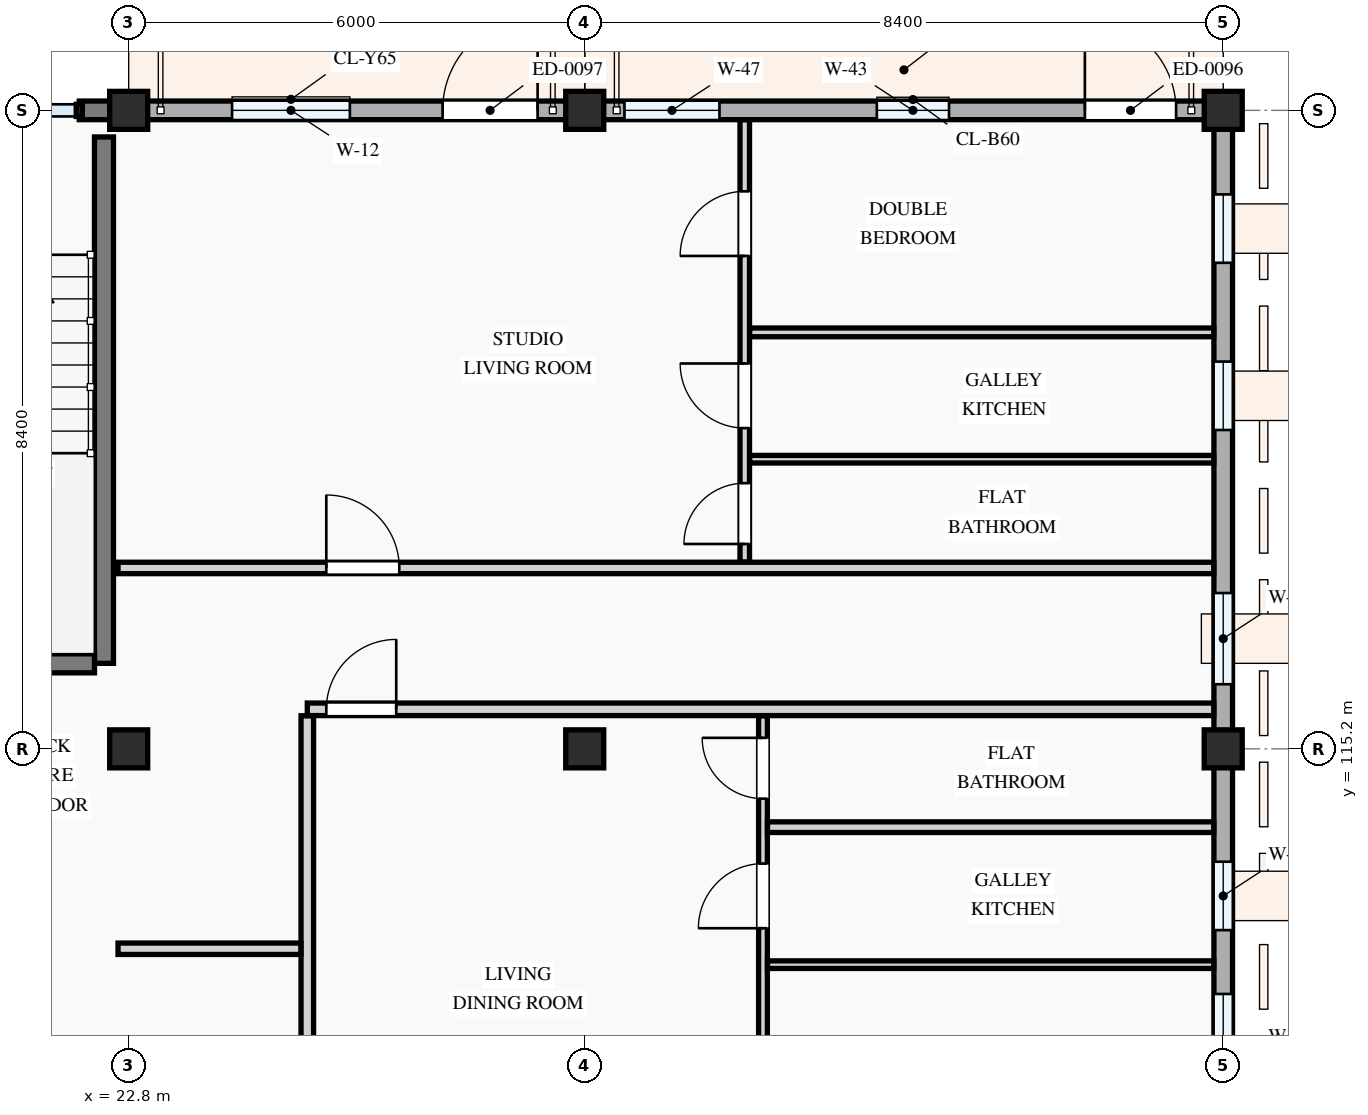
"""IFC4 building model, lengths in metres.
Left out: names, types, materials, properties, quantities, classifications, styles, units other than length and angle.
Written with IfcOpenShell. Run it as: python <this file> out.ifc"""

import sys

from ifc_helpers import new_model, si_unit, direction, frame, frame_2d, origin, origin_2d, place, context, subcontext, project, spatial, rectangle, extrude, element, fill, save


model = new_model("IFC4")
c1 = context("Model", 3, precision=1e-05, world=origin(), true_north=direction((0.0, 1.0)))
c2 = subcontext(c1, "Body", "Model", "MODEL_VIEW")
j1 = project(units=[si_unit("LENGTHUNIT", "METRE"), si_unit("PLANEANGLEUNIT", "RADIAN")], contexts=[c1])
p1 = place(None, origin())
s1 = spatial("IfcSite", under=j1, at=p1, CompositionType="ELEMENT")
p2 = place(p1, origin())
s2 = spatial("IfcBuilding", under=s1, at=p2, CompositionType="ELEMENT")
p3 = place(p2, frame((0.0, 0.0, 41.1)))
s3 = spatial("IfcBuildingStorey", under=s2, at=p3, CompositionType="ELEMENT", Elevation=41.1)
for number, where, z_axis, x_axis in (
    (1, (22.8, 115.2, 0.0), (0.0, 0.0, 1.0), (1.0, 0.0, 0.0)),
    (2, (22.8, 123.6, 0.0), (0.0, 0.0, 1.0), (1.0, 0.0, 0.0)),
    (3, (28.8, 115.2, 0.0), (0.0, 0.0, 1.0), (1.0, 0.0, 0.0)),
    (4, (28.8, 123.6, 0.0), (0.0, 0.0, 1.0), (1.0, 0.0, 0.0)),
    (5, (37.2, 115.2, 0.0), (0.0, 0.0, 1.0), (1.0, 0.0, 0.0)),
    (6, (37.2, 123.6, 0.0), (0.0, 0.0, 1.0), (1.0, 0.0, 0.0)),
):
    element("IfcColumn", number, at=place(p3, frame(where, z_axis=z_axis, x_axis=x_axis)), inside=s3, PredefinedType="COLUMN", context=c2, shape_type="SweptSolid", body=[
        extrude(rectangle(XDim=0.5, YDim=0.5, at=origin_2d()), origin(), (0.0, 0.0, 1.0), 3.3),
    ])
p4 = place(p3, frame((37.2, 109.2, 0.0), z_axis=(0.0, 0.0, 1.0), x_axis=(0.0, 1.0, 0.0)))
e7 = element("IfcWall", 7, at=p4, inside=s3, PredefinedType="STANDARD", context=c2, shape_type="SweptSolid", body=[
    extrude(rectangle(XDim=6.0, YDim=0.245, at=frame_2d((3.0, 0.0))), origin(), (0.0, 0.0, 1.0), 2.575),
])
p5 = place(p4, frame((0.575, 0.0, 0.78)))
e8 = element("IfcOpeningElement", 8, at=p5, cuts=e7, PredefinedType="OPENING", context=c2, shape_type="SweptSolid", body=[
    extrude(rectangle(XDim=2.2, YDim=1.5, at=frame_2d((1.1, 0.75))), frame((0.0, 0.133, 0.0), z_axis=(0.0, -1.0, 0.0), x_axis=(1.0, 0.0, 0.0)), (0.0, 0.0, 1.0), 0.265),
])
p6 = place(p4, frame((3.615, 0.0, 0.78)))
e9 = element("IfcOpeningElement", 9, at=p6, cuts=e7, PredefinedType="OPENING", context=c2, shape_type="SweptSolid", body=[
    extrude(rectangle(XDim=0.9, YDim=1.2, at=frame_2d((0.45, 0.6))), frame((0.0, 0.133, 0.0), z_axis=(0.0, -1.0, 0.0), x_axis=(1.0, 0.0, 0.0)), (0.0, 0.0, 1.0), 0.265),
])
p7 = place(p3, frame((37.2, 115.2, 0.0), z_axis=(0.0, 0.0, 1.0), x_axis=(0.0, 1.0, 0.0)))
e10 = element("IfcWall", 10, at=p7, inside=s3, PredefinedType="STANDARD", context=c2, shape_type="SweptSolid", body=[
    extrude(rectangle(XDim=8.4, YDim=0.245, at=frame_2d((4.2, 0.0))), origin(), (0.0, 0.0, 1.0), 2.425),
])
p8 = place(p7, frame((0.85, 0.0, 0.78)))
e11 = element("IfcOpeningElement", 11, at=p8, cuts=e10, PredefinedType="OPENING", context=c2, shape_type="SweptSolid", body=[
    extrude(rectangle(XDim=1.2, YDim=1.35, at=frame_2d((0.6, 0.675))), frame((0.0, 0.133, 0.0), z_axis=(0.0, -1.0, 0.0), x_axis=(1.0, 0.0, 0.0)), (0.0, 0.0, 1.0), 0.265),
])
p9 = place(p7, frame((4.195, 0.0, 0.78)))
e12 = element("IfcOpeningElement", 12, at=p9, cuts=e10, PredefinedType="OPENING", context=c2, shape_type="SweptSolid", body=[
    extrude(rectangle(XDim=0.9, YDim=1.2, at=frame_2d((0.45, 0.6))), frame((0.0, 0.133, 0.0), z_axis=(0.0, -1.0, 0.0), x_axis=(1.0, 0.0, 0.0)), (0.0, 0.0, 1.0), 0.265),
])
p10 = place(p7, frame((6.395, 0.0, 0.78)))
e13 = element("IfcOpeningElement", 13, at=p10, cuts=e10, PredefinedType="OPENING", context=c2, shape_type="SweptSolid", body=[
    extrude(rectangle(XDim=0.9, YDim=1.2, at=frame_2d((0.45, 0.6))), frame((0.0, 0.133, 0.0), z_axis=(0.0, -1.0, 0.0), x_axis=(1.0, 0.0, 0.0)), (0.0, 0.0, 1.0), 0.265),
])
p11 = place(p3, frame((37.2, 123.6, 0.0), z_axis=(0.0, 0.0, 1.0), x_axis=(-1.0, 0.0, 0.0)))
e14 = element("IfcWall", 14, at=p11, inside=s3, PredefinedType="STANDARD", context=c2, shape_type="SweptSolid", body=[
    extrude(rectangle(XDim=8.4, YDim=0.245, at=frame_2d((4.2, 0.0))), origin(), (0.0, 0.0, 1.0), 2.345),
])
p12 = place(p11, frame((0.62, 0.0, 0.0)))
e15 = element("IfcOpeningElement", 15, at=p12, cuts=e14, PredefinedType="OPENING", context=c2, shape_type="SweptSolid", body=[
    extrude(rectangle(XDim=1.2, YDim=2.15, at=frame_2d((0.6, 1.075))), frame((0.0, 0.133, 0.0), z_axis=(0.0, -1.0, 0.0), x_axis=(1.0, 0.0, 0.0)), (0.0, 0.0, 1.0), 0.265),
])
p13 = place(p11, frame((3.607, 0.0, 0.78)))
e16 = element("IfcOpeningElement", 16, at=p13, cuts=e14, PredefinedType="OPENING", context=c2, shape_type="SweptSolid", body=[
    extrude(rectangle(XDim=0.95, YDim=1.15, at=frame_2d((0.475, 0.575))), frame((0.0, 0.133, 0.0), z_axis=(0.0, -1.0, 0.0), x_axis=(1.0, 0.0, 0.0)), (0.0, 0.0, 1.0), 0.265),
])
p14 = place(p11, frame((6.627, 0.0, 0.78)))
e17 = element("IfcOpeningElement", 17, at=p14, cuts=e14, PredefinedType="OPENING", context=c2, shape_type="SweptSolid", body=[
    extrude(rectangle(XDim=1.25, YDim=1.45, at=frame_2d((0.625, 0.725))), frame((0.0, 0.133, 0.0), z_axis=(0.0, -1.0, 0.0), x_axis=(1.0, 0.0, 0.0)), (0.0, 0.0, 1.0), 0.265),
])
p15 = place(p3, frame((28.8, 123.6, 0.0), z_axis=(0.0, 0.0, 1.0), x_axis=(-1.0, 0.0, 0.0)))
e18 = element("IfcWall", 18, at=p15, inside=s3, PredefinedType="STANDARD", context=c2, shape_type="SweptSolid", body=[
    extrude(rectangle(XDim=6.0, YDim=0.245, at=frame_2d((3.0, 0.0))), origin(), (0.0, 0.0, 1.0), 2.445),
])
p16 = place(p15, frame((0.62, 0.0, 0.0)))
e19 = element("IfcOpeningElement", 19, at=p16, cuts=e18, PredefinedType="OPENING", context=c2, shape_type="SweptSolid", body=[
    extrude(rectangle(XDim=1.25, YDim=2.2, at=frame_2d((0.625, 1.1))), frame((0.0, 0.133, 0.0), z_axis=(0.0, -1.0, 0.0), x_axis=(1.0, 0.0, 0.0)), (0.0, 0.0, 1.0), 0.265),
])
p17 = place(p15, frame((3.09, 0.0, 0.78)))
e20 = element("IfcOpeningElement", 20, at=p17, cuts=e18, PredefinedType="OPENING", context=c2, shape_type="SweptSolid", body=[
    extrude(rectangle(XDim=1.55, YDim=1.4, at=frame_2d((0.775, 0.7))), frame((0.0, 0.133, 0.0), z_axis=(0.0, -1.0, 0.0), x_axis=(1.0, 0.0, 0.0)), (0.0, 0.0, 1.0), 0.265),
])
p18 = place(p3, frame((22.8, 123.6, 0.0), z_axis=(0.0, 0.0, 1.0), x_axis=(-1.0, 0.0, 0.0)))
e21 = element("IfcWall", 21, at=p18, inside=s3, PredefinedType="STANDARD", context=c2, shape_type="SweptSolid", body=[
    extrude(rectangle(XDim=0.65, YDim=0.245, at=frame_2d((0.325, 0.0))), origin(), (0.0, 0.0, 1.0), 3.04),
])
p19 = place(p3, frame((22.475, 123.25, 0.0), z_axis=(0.0, 0.0, 1.0), x_axis=(0.0, -1.0, 0.0)))
e22 = element("IfcWall", 22, at=p19, inside=s3, PredefinedType="SHEAR", context=c2, shape_type="SweptSolid", body=[
    extrude(rectangle(XDim=6.925, YDim=0.25, at=frame_2d((3.462, 0.0))), origin(), (0.0, 0.0, 1.0), 3.0),
])
p20 = place(p3, frame((8.85, 116.325, 0.0), z_axis=(0.0, 0.0, 1.0), x_axis=(1.0, 0.0, 0.0)))
e23 = element("IfcWall", 23, at=p20, inside=s3, PredefinedType="SHEAR", context=c2, shape_type="SweptSolid", body=[
    extrude(rectangle(XDim=13.5, YDim=0.25, at=frame_2d((6.75, 0.0))), origin(), (0.0, 0.0, 1.0), 3.0),
])
p21 = place(p20, frame((6.2, 0.0, 0.0)))
e24 = element("IfcOpeningElement", 24, at=p21, cuts=e23, PredefinedType="OPENING", context=c2, shape_type="SweptSolid", body=[
    extrude(rectangle(XDim=1.1, YDim=2.15, at=frame_2d((0.55, 1.075))), frame((0.0, 0.135, 0.0), z_axis=(0.0, -1.0, 0.0), x_axis=(1.0, 0.0, 0.0)), (0.0, 0.0, 1.0), 0.27),
])
p22 = place(p3, frame((25.15, 109.324, 0.0), z_axis=(0.0, 0.0, 1.0), x_axis=(0.0, 1.0, 0.0)))
e25 = element("IfcWall", 25, at=p22, inside=s3, PredefinedType="PARTITIONING", context=c2, shape_type="SweptSolid", body=[
    extrude(rectangle(XDim=6.311, YDim=0.165, at=frame_2d((3.156, 0.0))), origin(), (0.0, 0.0, 1.0), 3.0),
])
p23 = place(p3, frame((22.66, 112.57, 0.0), z_axis=(0.0, 0.0, 1.0), x_axis=(1.0, 0.0, 0.0)))
e26 = element("IfcWall", 26, at=p23, inside=s3, PredefinedType="PARTITIONING", context=c2, shape_type="SweptSolid", body=[
    extrude(rectangle(XDim=2.406, YDim=0.15, at=frame_2d((1.203, 0.0))), origin(), (0.0, 0.0, 1.0), 3.0),
])
p24 = place(p3, frame((31.145, 109.324, 0.0), z_axis=(0.0, 0.0, 1.0), x_axis=(0.0, 1.0, 0.0)))
e27 = element("IfcWall", 27, at=p24, inside=s3, PredefinedType="PARTITIONING", context=c2, shape_type="SweptSolid", body=[
    extrude(rectangle(XDim=6.311, YDim=0.115, at=frame_2d((3.156, 0.0))), origin(), (0.0, 0.0, 1.0), 3.0),
])
p25 = place(p24, frame((1.061, 0.0, 0.0)))
e28 = element("IfcOpeningElement", 28, at=p25, cuts=e27, PredefinedType="OPENING", context=c2, shape_type="SweptSolid", body=[
    extrude(rectangle(XDim=0.85, YDim=2.1, at=frame_2d((0.425, 1.05))), frame((0.0, 0.067, 0.0), z_axis=(0.0, -1.0, 0.0), x_axis=(1.0, 0.0, 0.0)), (0.0, 0.0, 1.0), 0.135),
])
p26 = place(p24, frame((3.516, 0.0, 0.0)))
e29 = element("IfcOpeningElement", 29, at=p26, cuts=e27, PredefinedType="OPENING", context=c2, shape_type="SweptSolid", body=[
    extrude(rectangle(XDim=0.85, YDim=2.1, at=frame_2d((0.425, 1.05))), frame((0.0, 0.067, 0.0), z_axis=(0.0, -1.0, 0.0), x_axis=(1.0, 0.0, 0.0)), (0.0, 0.0, 1.0), 0.135),
])
p27 = place(p24, frame((5.22, 0.0, 0.0)))
e30 = element("IfcOpeningElement", 30, at=p27, cuts=e27, PredefinedType="OPENING", context=c2, shape_type="SweptSolid", body=[
    extrude(rectangle(XDim=0.8, YDim=2.1, at=frame_2d((0.4, 1.05))), frame((0.0, 0.067, 0.0), z_axis=(0.0, -1.0, 0.0), x_axis=(1.0, 0.0, 0.0)), (0.0, 0.0, 1.0), 0.135),
])
p28 = place(p3, frame((31.205, 112.361, 0.0), z_axis=(0.0, 0.0, 1.0), x_axis=(1.0, 0.0, 0.0)))
e31 = element("IfcWall", 31, at=p28, inside=s3, PredefinedType="PARTITIONING", context=c2, shape_type="SweptSolid", body=[
    extrude(rectangle(XDim=5.871, YDim=0.1, at=frame_2d((2.936, 0.0))), origin(), (0.0, 0.0, 1.0), 3.0),
])
p29 = place(p3, frame((31.205, 114.17, 0.0), z_axis=(0.0, 0.0, 1.0), x_axis=(1.0, 0.0, 0.0)))
e32 = element("IfcWall", 32, at=p29, inside=s3, PredefinedType="PARTITIONING", context=c2, shape_type="SweptSolid", body=[
    extrude(rectangle(XDim=5.871, YDim=0.14, at=frame_2d((2.936, 0.0))), origin(), (0.0, 0.0, 1.0), 3.0),
])
p30 = place(p3, frame((30.905, 117.657, 0.0), z_axis=(0.0, 0.0, 1.0), x_axis=(0.0, 1.0, 0.0)))
e33 = element("IfcWall", 33, at=p30, inside=s3, PredefinedType="PARTITIONING", context=c2, shape_type="SweptSolid", body=[
    extrude(rectangle(XDim=5.819, YDim=0.125, at=frame_2d((2.909, 0.0))), origin(), (0.0, 0.0, 1.0), 3.0),
])
p31 = place(p30, frame((0.238, 0.0, 0.0)))
e34 = element("IfcOpeningElement", 34, at=p31, cuts=e33, PredefinedType="OPENING", context=c2, shape_type="SweptSolid", body=[
    extrude(rectangle(XDim=0.8, YDim=2.1, at=frame_2d((0.4, 1.05))), frame((0.0, 0.073, 0.0), z_axis=(0.0, -1.0, 0.0), x_axis=(1.0, 0.0, 0.0)), (0.0, 0.0, 1.0), 0.145),
])
p32 = place(p30, frame((1.763, 0.0, 0.0)))
e35 = element("IfcOpeningElement", 35, at=p32, cuts=e33, PredefinedType="OPENING", context=c2, shape_type="SweptSolid", body=[
    extrude(rectangle(XDim=0.85, YDim=2.1, at=frame_2d((0.425, 1.05))), frame((0.0, 0.073, 0.0), z_axis=(0.0, -1.0, 0.0), x_axis=(1.0, 0.0, 0.0)), (0.0, 0.0, 1.0), 0.145),
])
p33 = place(p30, frame((4.028, 0.0, 0.0)))
e36 = element("IfcOpeningElement", 36, at=p33, cuts=e33, PredefinedType="OPENING", context=c2, shape_type="SweptSolid", body=[
    extrude(rectangle(XDim=0.85, YDim=2.1, at=frame_2d((0.425, 1.05))), frame((0.0, 0.073, 0.0), z_axis=(0.0, -1.0, 0.0), x_axis=(1.0, 0.0, 0.0)), (0.0, 0.0, 1.0), 0.145),
])
p34 = place(p3, frame((30.97, 120.679, 0.0), z_axis=(0.0, 0.0, 1.0), x_axis=(1.0, 0.0, 0.0)))
e37 = element("IfcWall", 37, at=p34, inside=s3, PredefinedType="PARTITIONING", context=c2, shape_type="SweptSolid", body=[
    extrude(rectangle(XDim=6.106, YDim=0.115, at=frame_2d((3.053, 0.0))), origin(), (0.0, 0.0, 1.0), 3.0),
])
p35 = place(p3, frame((30.97, 119.01, 0.0), z_axis=(0.0, 0.0, 1.0), x_axis=(1.0, 0.0, 0.0)))
e38 = element("IfcWall", 38, at=p35, inside=s3, PredefinedType="PARTITIONING", context=c2, shape_type="SweptSolid", body=[
    extrude(rectangle(XDim=6.106, YDim=0.1, at=frame_2d((3.053, 0.0))), origin(), (0.0, 0.0, 1.0), 3.0),
])
p36 = place(p3, frame((25.15, 115.72, 0.0), z_axis=(0.0, 0.0, 1.0), x_axis=(1.0, 0.0, 0.0)))
e39 = element("IfcWall", 39, at=p36, inside=s3, PredefinedType="PARTITIONING", context=c2, shape_type="SweptSolid", body=[
    extrude(rectangle(XDim=11.926, YDim=0.165, at=frame_2d((5.963, 0.0))), origin(), (0.0, 0.0, 1.0), 3.0),
])
p37 = place(p36, frame((0.25, 0.0, 0.0)))
e40 = element("IfcOpeningElement", 40, at=p37, cuts=e39, PredefinedType="OPENING", context=c2, shape_type="SweptSolid", body=[
    extrude(rectangle(XDim=0.92, YDim=2.1, at=frame_2d((0.46, 1.05))), frame((0.0, 0.093, 0.0), z_axis=(0.0, -1.0, 0.0), x_axis=(1.0, 0.0, 0.0)), (0.0, 0.0, 1.0), 0.185),
])
p38 = place(p3, frame((22.66, 117.58, 0.0), z_axis=(0.0, 0.0, 1.0), x_axis=(1.0, 0.0, 0.0)))
e41 = element("IfcWall", 41, at=p38, inside=s3, PredefinedType="PARTITIONING", context=c2, shape_type="SweptSolid", body=[
    extrude(rectangle(XDim=14.416, YDim=0.15, at=frame_2d((7.208, 0.0))), origin(), (0.0, 0.0, 1.0), 3.0),
])
p39 = place(p38, frame((2.74, 0.0, 0.0)))
e42 = element("IfcOpeningElement", 42, at=p39, cuts=e41, PredefinedType="OPENING", context=c2, shape_type="SweptSolid", body=[
    extrude(rectangle(XDim=0.96, YDim=2.12, at=frame_2d((0.48, 1.06))), frame((0.0, 0.085, 0.0), z_axis=(0.0, -1.0, 0.0), x_axis=(1.0, 0.0, 0.0)), (0.0, 0.0, 1.0), 0.17),
])
p40 = place(p5, origin())
e43 = element("IfcWindow", 43, at=p40, inside=s3, PartitioningType="DOUBLE_PANEL_VERTICAL", PredefinedType="WINDOW", context=c2, shape_type="SweptSolid", body=[
    extrude(rectangle(XDim=2.2, YDim=1.5, at=frame_2d((1.1, 0.75))), frame((0.0, 0.03, 0.0), z_axis=(0.0, -1.0, 0.0), x_axis=(1.0, 0.0, 0.0)), (0.0, 0.0, 1.0), 0.06),
])
fill(e8, e43)
p41 = place(p6, origin())
e44 = element("IfcWindow", 44, at=p41, inside=s3, PartitioningType="SINGLE_PANEL", PredefinedType="WINDOW", context=c2, shape_type="SweptSolid", body=[
    extrude(rectangle(XDim=0.9, YDim=1.2, at=frame_2d((0.45, 0.6))), frame((0.0, 0.03, 0.0), z_axis=(0.0, -1.0, 0.0), x_axis=(1.0, 0.0, 0.0)), (0.0, 0.0, 1.0), 0.06),
])
fill(e9, e44)
p42 = place(p8, origin())
e45 = element("IfcWindow", 45, at=p42, inside=s3, PartitioningType="SINGLE_PANEL", PredefinedType="WINDOW", context=c2, shape_type="SweptSolid", body=[
    extrude(rectangle(XDim=1.2, YDim=1.35, at=frame_2d((0.6, 0.675))), frame((0.0, 0.03, 0.0), z_axis=(0.0, -1.0, 0.0), x_axis=(1.0, 0.0, 0.0)), (0.0, 0.0, 1.0), 0.06),
])
fill(e11, e45)
p43 = place(p9, origin())
e46 = element("IfcWindow", 46, at=p43, inside=s3, PartitioningType="SINGLE_PANEL", PredefinedType="WINDOW", context=c2, shape_type="SweptSolid", body=[
    extrude(rectangle(XDim=0.9, YDim=1.2, at=frame_2d((0.45, 0.6))), frame((0.0, 0.03, 0.0), z_axis=(0.0, -1.0, 0.0), x_axis=(1.0, 0.0, 0.0)), (0.0, 0.0, 1.0), 0.06),
])
fill(e12, e46)
p44 = place(p10, origin())
e47 = element("IfcWindow", 47, at=p44, inside=s3, PartitioningType="SINGLE_PANEL", PredefinedType="WINDOW", context=c2, shape_type="SweptSolid", body=[
    extrude(rectangle(XDim=0.9, YDim=1.2, at=frame_2d((0.45, 0.6))), frame((0.0, 0.03, 0.0), z_axis=(0.0, -1.0, 0.0), x_axis=(1.0, 0.0, 0.0)), (0.0, 0.0, 1.0), 0.06),
])
fill(e13, e47)
p45 = place(p12, frame((1.2, 0.0, 0.0), z_axis=(0.0, 0.0, 1.0), x_axis=(-1.0, 0.0, 0.0)))
e48 = element("IfcDoor", 48, at=p45, inside=s3, OperationType="SINGLE_SWING_LEFT", PredefinedType="DOOR", context=c2, shape_type="SweptSolid", body=[
    extrude(rectangle(XDim=1.2, YDim=2.15, at=frame_2d((0.6, 1.075))), frame((0.0, 0.025, 0.0), z_axis=(0.0, -1.0, 0.0), x_axis=(1.0, 0.0, 0.0)), (0.0, 0.0, 1.0), 0.05),
])
fill(e15, e48)
p46 = place(p13, origin())
e49 = element("IfcWindow", 49, at=p46, inside=s3, PartitioningType="SINGLE_PANEL", PredefinedType="WINDOW", context=c2, shape_type="SweptSolid", body=[
    extrude(rectangle(XDim=0.95, YDim=1.15, at=frame_2d((0.475, 0.575))), frame((0.0, 0.03, 0.0), z_axis=(0.0, -1.0, 0.0), x_axis=(1.0, 0.0, 0.0)), (0.0, 0.0, 1.0), 0.06),
])
fill(e16, e49)
p47 = place(p14, origin())
e50 = element("IfcWindow", 50, at=p47, inside=s3, PartitioningType="SINGLE_PANEL", PredefinedType="WINDOW", context=c2, shape_type="SweptSolid", body=[
    extrude(rectangle(XDim=1.25, YDim=1.45, at=frame_2d((0.625, 0.725))), frame((0.0, 0.03, 0.0), z_axis=(0.0, -1.0, 0.0), x_axis=(1.0, 0.0, 0.0)), (0.0, 0.0, 1.0), 0.06),
])
fill(e17, e50)
p48 = place(p16, frame((1.25, 0.0, 0.0), z_axis=(0.0, 0.0, 1.0), x_axis=(-1.0, 0.0, 0.0)))
e51 = element("IfcDoor", 51, at=p48, inside=s3, OperationType="SINGLE_SWING_RIGHT", PredefinedType="DOOR", context=c2, shape_type="SweptSolid", body=[
    extrude(rectangle(XDim=1.25, YDim=2.2, at=frame_2d((0.625, 1.1))), frame((0.0, 0.025, 0.0), z_axis=(0.0, -1.0, 0.0), x_axis=(1.0, 0.0, 0.0)), (0.0, 0.0, 1.0), 0.05),
])
fill(e19, e51)
p49 = place(p17, origin())
e52 = element("IfcWindow", 52, at=p49, inside=s3, PartitioningType="SINGLE_PANEL", PredefinedType="WINDOW", context=c2, shape_type="SweptSolid", body=[
    extrude(rectangle(XDim=1.55, YDim=1.4, at=frame_2d((0.775, 0.7))), frame((0.0, 0.03, 0.0), z_axis=(0.0, -1.0, 0.0), x_axis=(1.0, 0.0, 0.0)), (0.0, 0.0, 1.0), 0.06),
])
fill(e20, e52)
p50 = place(p26, origin())
e53 = element("IfcDoor", 53, at=p50, inside=s3, OperationType="SINGLE_SWING_LEFT", PredefinedType="DOOR", context=c2, shape_type="SweptSolid", body=[
    extrude(rectangle(XDim=0.85, YDim=2.1, at=frame_2d((0.425, 1.05))), frame((0.0, 0.025, 0.0), z_axis=(0.0, -1.0, 0.0), x_axis=(1.0, 0.0, 0.0)), (0.0, 0.0, 1.0), 0.05),
])
fill(e29, e53)
p51 = place(p27, origin())
e54 = element("IfcDoor", 54, at=p51, inside=s3, OperationType="SINGLE_SWING_RIGHT", PredefinedType="DOOR", context=c2, shape_type="SweptSolid", body=[
    extrude(rectangle(XDim=0.8, YDim=2.1, at=frame_2d((0.4, 1.05))), frame((0.0, 0.025, 0.0), z_axis=(0.0, -1.0, 0.0), x_axis=(1.0, 0.0, 0.0)), (0.0, 0.0, 1.0), 0.05),
])
fill(e30, e54)
p52 = place(p31, origin())
e55 = element("IfcDoor", 55, at=p52, inside=s3, OperationType="SINGLE_SWING_LEFT", PredefinedType="DOOR", context=c2, shape_type="SweptSolid", body=[
    extrude(rectangle(XDim=0.8, YDim=2.1, at=frame_2d((0.4, 1.05))), frame((0.0, 0.025, 0.0), z_axis=(0.0, -1.0, 0.0), x_axis=(1.0, 0.0, 0.0)), (0.0, 0.0, 1.0), 0.05),
])
fill(e34, e55)
p53 = place(p32, origin())
e56 = element("IfcDoor", 56, at=p53, inside=s3, OperationType="SINGLE_SWING_RIGHT", PredefinedType="DOOR", context=c2, shape_type="SweptSolid", body=[
    extrude(rectangle(XDim=0.85, YDim=2.1, at=frame_2d((0.425, 1.05))), frame((0.0, 0.025, 0.0), z_axis=(0.0, -1.0, 0.0), x_axis=(1.0, 0.0, 0.0)), (0.0, 0.0, 1.0), 0.05),
])
fill(e35, e56)
p54 = place(p33, origin())
e57 = element("IfcDoor", 57, at=p54, inside=s3, OperationType="SINGLE_SWING_LEFT", PredefinedType="DOOR", context=c2, shape_type="SweptSolid", body=[
    extrude(rectangle(XDim=0.85, YDim=2.1, at=frame_2d((0.425, 1.05))), frame((0.0, 0.025, 0.0), z_axis=(0.0, -1.0, 0.0), x_axis=(1.0, 0.0, 0.0)), (0.0, 0.0, 1.0), 0.05),
])
fill(e36, e57)
p55 = place(p37, origin())
e58 = element("IfcDoor", 58, at=p55, inside=s3, OperationType="SINGLE_SWING_RIGHT", PredefinedType="DOOR", context=c2, shape_type="SweptSolid", body=[
    extrude(rectangle(XDim=0.92, YDim=2.1, at=frame_2d((0.46, 1.05))), frame((0.0, 0.025, 0.0), z_axis=(0.0, -1.0, 0.0), x_axis=(1.0, 0.0, 0.0)), (0.0, 0.0, 1.0), 0.05),
])
fill(e40, e58)
p56 = place(p39, origin())
e59 = element("IfcDoor", 59, at=p56, inside=s3, OperationType="SINGLE_SWING_LEFT", PredefinedType="DOOR", context=c2, shape_type="SweptSolid", body=[
    extrude(rectangle(XDim=0.96, YDim=2.12, at=frame_2d((0.48, 1.06))), frame((0.0, 0.025, 0.0), z_axis=(0.0, -1.0, 0.0), x_axis=(1.0, 0.0, 0.0)), (0.0, 0.0, 1.0), 0.05),
])
fill(e42, e59)
save(model, sys.argv[1])
